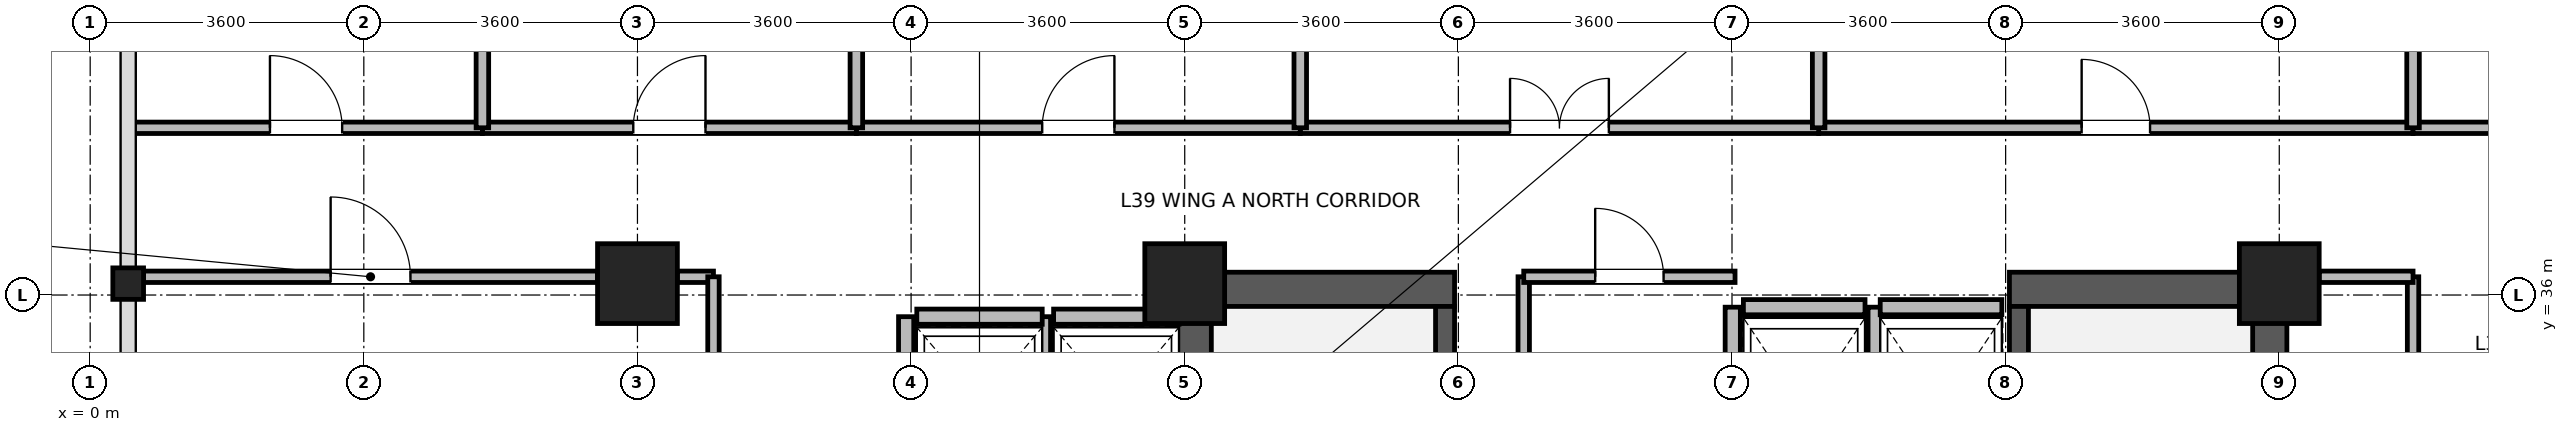
"""IFC4 building model, lengths in metres.
Left out: names, types, materials, properties, quantities, classifications, styles, units other than length and angle.
Written with IfcOpenShell. Run it as: python <this file> out.ifc"""

import sys

from ifc_helpers import new_model, si_unit, direction, frame, frame_2d, origin, origin_2d, place, context, subcontext, project, spatial, rectangle, i_section, extrude, source, transform, mapped, element, fill, save


model = new_model("IFC4")
c1 = context("Model", 3, precision=1e-05, world=origin(), true_north=direction((0.0, 1.0)))
c2 = subcontext(c1, "Body", "Model", "MODEL_VIEW")
j1 = project(units=[si_unit("LENGTHUNIT", "METRE"), si_unit("PLANEANGLEUNIT", "RADIAN")], contexts=[c1])
p1 = place(None, origin())
s1 = spatial("IfcSite", under=j1, at=p1, CompositionType="ELEMENT")
p2 = place(p1, origin())
s2 = spatial("IfcBuilding", under=s1, at=p2, CompositionType="ELEMENT")
p3 = place(p2, frame((0.0, 0.0, 155.0)))
s3 = spatial("IfcBuildingStorey", under=s2, at=p3, CompositionType="ELEMENT", Elevation=155.0)
for number, where, z_axis, x_axis in (
    (1, (14.525, 28.4, 0.0), (0.0, 0.0, 1.0), (0.0, 1.0, 0.0)),
    (2, (28.675, 28.4, 0.0), (0.0, 0.0, 1.0), (0.0, 1.0, 0.0)),
):
    element("IfcWall", number, at=place(p3, frame(where, z_axis=z_axis, x_axis=x_axis)), inside=s3, PredefinedType="SHEAR", context=c2, shape_type="SweptSolid", body=[
        extrude(rectangle(XDim=7.9, YDim=0.45, at=frame_2d((3.95, 0.0))), origin(), (0.0, 0.0, 1.0), 3.46),
    ])
for number, where, z_axis, x_axis in (
    (3, (14.75, 36.075, 0.0), (0.0, 0.0, 1.0), (1.0, 0.0, 0.0)),
    (4, (25.25, 36.075, 0.0), (0.0, 0.0, 1.0), (1.0, 0.0, 0.0)),
):
    element("IfcWall", number, at=place(p3, frame(where, z_axis=z_axis, x_axis=x_axis)), inside=s3, PredefinedType="SHEAR", context=c2, shape_type="SweptSolid", body=[
        extrude(rectangle(XDim=3.2, YDim=0.45, at=frame_2d((1.6, 0.0))), origin(), (0.0, 0.0, 1.0), 3.46),
    ])
p4 = place(p3, frame((17.825, 28.85, 0.0), z_axis=(0.0, 0.0, 1.0), x_axis=(0.0, 1.0, 0.0)))
e5 = element("IfcWall", 5, at=p4, inside=s3, PredefinedType="SHEAR", context=c2, shape_type="SweptSolid", body=[
    extrude(rectangle(XDim=7.0, YDim=0.25, at=frame_2d((3.5, 0.0))), origin(), (0.0, 0.0, 1.0), 3.46),
])
p5 = place(p4, frame((0.15, 0.0, 0.0)))
e6 = element("IfcOpeningElement", 6, at=p5, cuts=e5, PredefinedType="OPENING", context=c2, shape_type="SweptSolid", body=[
    extrude(rectangle(XDim=1.1, YDim=2.08, at=frame_2d((0.55, 1.04))), frame((0.0, 0.135, 0.0), z_axis=(0.0, -1.0, 0.0), x_axis=(1.0, 0.0, 0.0)), (0.0, 0.0, 1.0), 0.27),
])
p6 = place(p3, frame((25.375, 28.85, 0.0), z_axis=(0.0, 0.0, 1.0), x_axis=(0.0, 1.0, 0.0)))
e7 = element("IfcWall", 7, at=p6, inside=s3, PredefinedType="SHEAR", context=c2, shape_type="SweptSolid", body=[
    extrude(rectangle(XDim=7.0, YDim=0.25, at=frame_2d((3.5, 0.0))), origin(), (0.0, 0.0, 1.0), 3.46),
])
p7 = place(p6, frame((0.15, 0.0, 0.0)))
e8 = element("IfcOpeningElement", 8, at=p7, cuts=e7, PredefinedType="OPENING", context=c2, shape_type="SweptSolid", body=[
    extrude(rectangle(XDim=1.1, YDim=2.08, at=frame_2d((0.55, 1.04))), frame((0.0, 0.135, 0.0), z_axis=(0.0, -1.0, 0.0), x_axis=(1.0, 0.0, 0.0)), (0.0, 0.0, 1.0), 0.27),
])
m1 = source(origin(), c2, "Body", "SweptSolid", [
    extrude(rectangle(XDim=1.05, YDim=1.05, at=origin_2d()), origin(), (0.0, 0.0, 1.0), 3.7),
])
for number, where, z_axis, x_axis in (
    (9, (7.2, 36.15, 0.0), (0.0, 0.0, 1.0), (1.0, 0.0, 0.0)),
    (10, (14.4, 36.15, 0.0), (0.0, 0.0, 1.0), (1.0, 0.0, 0.0)),
    (11, (28.8, 36.15, 0.0), (0.0, 0.0, 1.0), (1.0, 0.0, 0.0)),
):
    element("IfcColumn", number, at=place(p3, frame(where, z_axis=z_axis, x_axis=x_axis)), inside=s3, PredefinedType="COLUMN", context=c2, shape_type="MappedRepresentation", body=[
        mapped(m1, transform((0.0, 0.0, 0.0), x_axis=(1.0, 0.0, 0.0), y_axis=(0.0, 1.0, 0.0), z_axis=(0.0, 0.0, 1.0), scale=1.0)),
    ])
m2 = source(origin(), c2, "Body", "SweptSolid", [
    extrude(i_section(OverallWidth=0.404, OverallDepth=0.414, WebThickness=0.021, FlangeThickness=0.028, FilletRadius=0.015, at=origin_2d()), origin(), (0.0, 0.0, 1.0), 3.7),
])
p8 = place(p3, frame((0.5, 36.15, 0.0), z_axis=(0.0, 0.0, 1.0), x_axis=(1.0, 0.0, 0.0)))
e12 = element("IfcColumn", 12, at=p8, inside=s3, PredefinedType="COLUMN", context=c2, shape_type="MappedRepresentation", body=[
    mapped(m2, transform((0.0, 0.0, 0.0), x_axis=(1.0, 0.0, 0.0), y_axis=(0.0, 1.0, 0.0), z_axis=(0.0, 0.0, 1.0), scale=1.0)),
])
p9 = place(p3, frame((12.675, 35.715, 0.0), z_axis=(0.0, 0.0, 1.0), x_axis=(1.0, 0.0, 0.0)))
e13 = element("IfcWall", 13, at=p9, inside=s3, PredefinedType="PARTITIONING", context=c2, shape_type="SweptSolid", body=[
    extrude(rectangle(XDim=1.65, YDim=0.2, at=frame_2d((0.825, 0.0))), origin(), (0.0, 0.0, 1.0), 3.44),
])
p10 = place(p3, frame((12.535, 33.485, 0.0), z_axis=(0.0, 0.0, 1.0), x_axis=(0.0, 1.0, 0.0)))
e14 = element("IfcWall", 14, at=p10, inside=s3, PredefinedType="PARTITIONING", context=c2, shape_type="SweptSolid", body=[
    extrude(rectangle(XDim=2.23, YDim=0.2, at=frame_2d((1.115, 0.0))), origin(), (0.0, 0.0, 1.0), 3.44),
])
p11 = place(p3, frame((10.875, 35.715, 0.0), z_axis=(0.0, 0.0, 1.0), x_axis=(1.0, 0.0, 0.0)))
e15 = element("IfcWall", 15, at=p11, inside=s3, PredefinedType="PARTITIONING", context=c2, shape_type="SweptSolid", body=[
    extrude(rectangle(XDim=1.65, YDim=0.2, at=frame_2d((0.825, 0.0))), origin(), (0.0, 0.0, 1.0), 3.44),
])
p12 = place(p3, frame((10.735, 33.485, 0.0), z_axis=(0.0, 0.0, 1.0), x_axis=(0.0, 1.0, 0.0)))
e16 = element("IfcWall", 16, at=p12, inside=s3, PredefinedType="PARTITIONING", context=c2, shape_type="SweptSolid", body=[
    extrude(rectangle(XDim=2.23, YDim=0.2, at=frame_2d((1.115, 0.0))), origin(), (0.0, 0.0, 1.0), 3.44),
])
p13 = place(p3, frame((21.75, 35.84, 0.0), z_axis=(0.0, 0.0, 1.0), x_axis=(1.0, 0.0, 0.0)))
e17 = element("IfcWall", 17, at=p13, inside=s3, PredefinedType="PARTITIONING", context=c2, shape_type="SweptSolid", body=[
    extrude(rectangle(XDim=1.6, YDim=0.2, at=frame_2d((0.8, 0.0))), origin(), (0.0, 0.0, 1.0), 2.44),
])
for number, where, z_axis, x_axis in (
    (18, (21.61, 33.16, 0.0), (0.0, 0.0, 1.0), (0.0, 1.0, 0.0)),
    (19, (23.49, 33.16, 0.0), (0.0, 0.0, 1.0), (0.0, 1.0, 0.0)),
):
    element("IfcWall", number, at=place(p3, frame(where, z_axis=z_axis, x_axis=x_axis)), inside=s3, PredefinedType="PARTITIONING", context=c2, shape_type="SweptSolid", body=[
        extrude(rectangle(XDim=2.68, YDim=0.2, at=frame_2d((1.34, 0.0))), origin(), (0.0, 0.0, 1.0), 3.44),
    ])
p14 = place(p3, frame((23.55, 35.84, 0.0), z_axis=(0.0, 0.0, 1.0), x_axis=(1.0, 0.0, 0.0)))
e20 = element("IfcWall", 20, at=p14, inside=s3, PredefinedType="PARTITIONING", context=c2, shape_type="SweptSolid", body=[
    extrude(rectangle(XDim=1.6, YDim=0.2, at=frame_2d((0.8, 0.0))), origin(), (0.0, 0.0, 1.0), 2.44),
])
p15 = place(p3, frame((22.74, 38.2, 0.0), z_axis=(0.0, 0.0, 1.0), x_axis=(1.0, 0.0, 0.0)))
e21 = element("IfcWall", 21, at=p15, inside=s3, PredefinedType="PARTITIONING", context=c2, shape_type="SweptSolid", body=[
    extrude(rectangle(XDim=7.82, YDim=0.15, at=frame_2d((3.91, 0.0))), origin(), (0.0, 0.0, 1.0), 3.44),
])
p16 = place(p15, frame((3.46, 0.0, 0.0)))
e22 = element("IfcOpeningElement", 22, at=p16, cuts=e21, PredefinedType="OPENING", context=c2, shape_type="SweptSolid", body=[
    extrude(rectangle(XDim=0.9, YDim=2.08, at=frame_2d((0.45, 1.04))), frame((0.0, 0.085, 0.0), z_axis=(0.0, -1.0, 0.0), x_axis=(1.0, 0.0, 0.0)), (0.0, 0.0, 1.0), 0.17),
])
p17 = place(p3, frame((0.702, 36.24, 0.0), z_axis=(0.0, 0.0, 1.0), x_axis=(1.0, 0.0, 0.0)))
e23 = element("IfcWall", 23, at=p17, inside=s3, PredefinedType="PARTITIONING", context=c2, shape_type="SweptSolid", body=[
    extrude(rectangle(XDim=5.973, YDim=0.15, at=frame_2d((2.987, 0.0))), origin(), (0.0, 0.0, 1.0), 2.84),
])
p18 = place(p17, frame((2.461, 0.0, 0.0)))
e24 = element("IfcOpeningElement", 24, at=p18, cuts=e23, PredefinedType="OPENING", context=c2, shape_type="SweptSolid", body=[
    extrude(rectangle(XDim=1.05, YDim=2.12, at=frame_2d((0.525, 1.06))), frame((0.0, 0.085, 0.0), z_axis=(0.0, -1.0, 0.0), x_axis=(1.0, 0.0, 0.0)), (0.0, 0.0, 1.0), 0.17),
])
p19 = place(p3, frame((7.725, 36.24, 0.0), z_axis=(0.0, 0.0, 1.0), x_axis=(1.0, 0.0, 0.0)))
e25 = element("IfcWall", 25, at=p19, inside=s3, PredefinedType="PARTITIONING", context=c2, shape_type="SweptSolid", body=[
    extrude(rectangle(XDim=0.475, YDim=0.15, at=frame_2d((0.237, 0.0))), origin(), (0.0, 0.0, 1.0), 2.84),
])
p20 = place(p3, frame((15.92, 38.2, 0.0), z_axis=(0.0, 0.0, 1.0), x_axis=(1.0, 0.0, 0.0)))
e26 = element("IfcWall", 26, at=p20, inside=s3, PredefinedType="PARTITIONING", context=c2, shape_type="SweptSolid", body=[
    extrude(rectangle(XDim=6.82, YDim=0.15, at=frame_2d((3.41, 0.0))), origin(), (0.0, 0.0, 1.0), 3.44),
])
p21 = place(p20, frame((2.76, 0.0, 0.0)))
e27 = element("IfcOpeningElement", 27, at=p21, cuts=e26, PredefinedType="OPENING", context=c2, shape_type="SweptSolid", body=[
    extrude(rectangle(XDim=1.3, YDim=2.12, at=frame_2d((0.65, 1.06))), frame((0.0, 0.085, 0.0), z_axis=(0.0, -1.0, 0.0), x_axis=(1.0, 0.0, 0.0)), (0.0, 0.0, 1.0), 0.17),
])
p22 = place(p3, frame((10.08, 38.2, 0.0), z_axis=(0.0, 0.0, 1.0), x_axis=(1.0, 0.0, 0.0)))
e28 = element("IfcWall", 28, at=p22, inside=s3, PredefinedType="PARTITIONING", context=c2, shape_type="SweptSolid", body=[
    extrude(rectangle(XDim=5.84, YDim=0.15, at=frame_2d((2.92, 0.0))), origin(), (0.0, 0.0, 1.0), 3.44),
])
p23 = place(p22, frame((2.445, 0.0, 0.0)))
e29 = element("IfcOpeningElement", 29, at=p23, cuts=e28, PredefinedType="OPENING", context=c2, shape_type="SweptSolid", body=[
    extrude(rectangle(XDim=0.95, YDim=2.1, at=frame_2d((0.475, 1.05))), frame((0.0, 0.085, 0.0), z_axis=(0.0, -1.0, 0.0), x_axis=(1.0, 0.0, 0.0)), (0.0, 0.0, 1.0), 0.17),
])
p24 = place(p3, frame((5.16, 38.2, 0.0), z_axis=(0.0, 0.0, 1.0), x_axis=(1.0, 0.0, 0.0)))
e30 = element("IfcWall", 30, at=p24, inside=s3, PredefinedType="PARTITIONING", context=c2, shape_type="SweptSolid", body=[
    extrude(rectangle(XDim=4.92, YDim=0.15, at=frame_2d((2.46, 0.0))), origin(), (0.0, 0.0, 1.0), 3.44),
])
p25 = place(p24, frame((1.985, 0.0, 0.0)))
e31 = element("IfcOpeningElement", 31, at=p25, cuts=e30, PredefinedType="OPENING", context=c2, shape_type="SweptSolid", body=[
    extrude(rectangle(XDim=0.95, YDim=2.1, at=frame_2d((0.475, 1.05))), frame((0.0, 0.085, 0.0), z_axis=(0.0, -1.0, 0.0), x_axis=(1.0, 0.0, 0.0)), (0.0, 0.0, 1.0), 0.17),
])
p26 = place(p3, frame((30.56, 38.2, 0.0), z_axis=(0.0, 0.0, 1.0), x_axis=(1.0, 0.0, 0.0)))
e32 = element("IfcWall", 32, at=p26, inside=s3, PredefinedType="PARTITIONING", context=c2, shape_type="SweptSolid", body=[
    extrude(rectangle(XDim=4.8, YDim=0.15, at=frame_2d((2.4, 0.0))), origin(), (0.0, 0.0, 1.0), 3.44),
])
p27 = place(p26, frame((1.75, 0.0, 0.0)))
e33 = element("IfcOpeningElement", 33, at=p27, cuts=e32, PredefinedType="OPENING", context=c2, shape_type="SweptSolid", body=[
    extrude(rectangle(XDim=1.3, YDim=2.12, at=frame_2d((0.65, 1.06))), frame((0.0, 0.085, 0.0), z_axis=(0.0, -1.0, 0.0), x_axis=(1.0, 0.0, 0.0)), (0.0, 0.0, 1.0), 0.17),
])
p28 = place(p3, frame((0.52, 38.2, 0.0), z_axis=(0.0, 0.0, 1.0), x_axis=(1.0, 0.0, 0.0)))
e34 = element("IfcWall", 34, at=p28, inside=s3, PredefinedType="PARTITIONING", context=c2, shape_type="SweptSolid", body=[
    extrude(rectangle(XDim=4.64, YDim=0.15, at=frame_2d((2.32, 0.0))), origin(), (0.0, 0.0, 1.0), 3.44),
])
p29 = place(p28, frame((1.845, 0.0, 0.0)))
e35 = element("IfcOpeningElement", 35, at=p29, cuts=e34, PredefinedType="OPENING", context=c2, shape_type="SweptSolid", body=[
    extrude(rectangle(XDim=0.95, YDim=2.1, at=frame_2d((0.475, 1.05))), frame((0.0, 0.085, 0.0), z_axis=(0.0, -1.0, 0.0), x_axis=(1.0, 0.0, 0.0)), (0.0, 0.0, 1.0), 0.17),
])
p30 = place(p3, frame((30.56, 31.64, 0.0), z_axis=(0.0, 0.0, 1.0), x_axis=(0.0, 1.0, 0.0)))
e36 = element("IfcWall", 36, at=p30, inside=s3, PredefinedType="PARTITIONING", context=c2, shape_type="SweptSolid", body=[
    extrude(rectangle(XDim=4.6, YDim=0.15, at=frame_2d((2.3, 0.0))), origin(), (0.0, 0.0, 1.0), 3.44),
])
p31 = place(p30, frame((1.65, 0.0, 0.0)))
e37 = element("IfcOpeningElement", 37, at=p31, cuts=e36, PredefinedType="OPENING", context=c2, shape_type="SweptSolid", body=[
    extrude(rectangle(XDim=1.3, YDim=2.12, at=frame_2d((0.65, 1.06))), frame((0.0, 0.085, 0.0), z_axis=(0.0, -1.0, 0.0), x_axis=(1.0, 0.0, 0.0)), (0.0, 0.0, 1.0), 0.17),
])
p32 = place(p3, frame((8.2, 32.4, 0.0), z_axis=(0.0, 0.0, 1.0), x_axis=(0.0, 1.0, 0.0)))
e38 = element("IfcWall", 38, at=p32, inside=s3, PredefinedType="PARTITIONING", context=c2, shape_type="SweptSolid", body=[
    extrude(rectangle(XDim=3.84, YDim=0.15, at=frame_2d((1.92, 0.0))), origin(), (0.0, 0.0, 1.0), 3.44),
])
p33 = place(p3, frame((18.86, 33.36, 0.0), z_axis=(0.0, 0.0, 1.0), x_axis=(0.0, 1.0, 0.0)))
e39 = element("IfcWall", 39, at=p33, inside=s3, PredefinedType="PARTITIONING", context=c2, shape_type="SweptSolid", body=[
    extrude(rectangle(XDim=2.88, YDim=0.15, at=frame_2d((1.44, 0.0))), origin(), (0.0, 0.0, 1.0), 3.44),
])
p34 = place(p3, frame((18.86, 36.24, 0.0), z_axis=(0.0, 0.0, 1.0), x_axis=(1.0, 0.0, 0.0)))
e40 = element("IfcWall", 40, at=p34, inside=s3, PredefinedType="PARTITIONING", context=c2, shape_type="SweptSolid", body=[
    extrude(rectangle(XDim=2.78, YDim=0.15, at=frame_2d((1.39, 0.0))), origin(), (0.0, 0.0, 1.0), 2.44),
])
p35 = place(p34, frame((0.94, 0.0, 0.0)))
e41 = element("IfcOpeningElement", 41, at=p35, cuts=e40, PredefinedType="OPENING", context=c2, shape_type="SweptSolid", body=[
    extrude(rectangle(XDim=0.9, YDim=2.08, at=frame_2d((0.45, 1.04))), frame((0.0, 0.085, 0.0), z_axis=(0.0, -1.0, 0.0), x_axis=(1.0, 0.0, 0.0)), (0.0, 0.0, 1.0), 0.17),
])
p36 = place(p3, frame((29.325, 36.24, 0.0), z_axis=(0.0, 0.0, 1.0), x_axis=(1.0, 0.0, 0.0)))
e42 = element("IfcWall", 42, at=p36, inside=s3, PredefinedType="PARTITIONING", context=c2, shape_type="SweptSolid", body=[
    extrude(rectangle(XDim=1.235, YDim=0.15, at=frame_2d((0.618, 0.0))), origin(), (0.0, 0.0, 1.0), 2.84),
])
for number, where, z_axis, x_axis in (
    (43, (15.92, 38.2, 0.0), (0.0, 0.0, 1.0), (0.0, 1.0, 0.0)),
    (44, (22.74, 38.2, 0.0), (0.0, 0.0, 1.0), (0.0, 1.0, 0.0)),
    (45, (30.56, 38.2, 0.0), (0.0, 0.0, 1.0), (0.0, 1.0, 0.0)),
):
    element("IfcWall", number, at=place(p3, frame(where, z_axis=z_axis, x_axis=x_axis)), inside=s3, PredefinedType="PARTITIONING", context=c2, shape_type="SweptSolid", body=[
        extrude(rectangle(XDim=4.868, YDim=0.165, at=frame_2d((2.434, 0.0))), origin(), (0.0, 0.0, 1.0), 3.44),
    ])
for number, where, z_axis, x_axis in (
    (46, (5.16, 38.2, 0.0), (0.0, 0.0, 1.0), (0.0, 1.0, 0.0)),
    (47, (10.08, 38.2, 0.0), (0.0, 0.0, 1.0), (0.0, 1.0, 0.0)),
):
    element("IfcWall", number, at=place(p3, frame(where, z_axis=z_axis, x_axis=x_axis)), inside=s3, PredefinedType="PARTITIONING", context=c2, shape_type="SweptSolid", body=[
        extrude(rectangle(XDim=3.1, YDim=0.165, at=frame_2d((1.55, 0.0))), origin(), (0.0, 0.0, 1.0), 3.44),
    ])
p37 = place(p16, origin())
e48 = element("IfcDoor", 48, at=p37, inside=s3, OperationType="SINGLE_SWING_LEFT", PredefinedType="DOOR", context=c2, shape_type="SweptSolid", body=[
    extrude(rectangle(XDim=0.9, YDim=2.08, at=frame_2d((0.45, 1.04))), frame((0.0, 0.025, 0.0), z_axis=(0.0, -1.0, 0.0), x_axis=(1.0, 0.0, 0.0)), (0.0, 0.0, 1.0), 0.05),
])
fill(e22, e48)
p38 = place(p18, origin())
e49 = element("IfcDoor", 49, at=p38, inside=s3, OperationType="SINGLE_SWING_LEFT", PredefinedType="DOOR", context=c2, shape_type="SweptSolid", body=[
    extrude(rectangle(XDim=1.05, YDim=2.12, at=frame_2d((0.525, 1.06))), frame((0.0, 0.025, 0.0), z_axis=(0.0, -1.0, 0.0), x_axis=(1.0, 0.0, 0.0)), (0.0, 0.0, 1.0), 0.05),
])
fill(e24, e49)
p39 = place(p21, origin())
e50 = element("IfcDoor", 50, at=p39, inside=s3, OperationType="DOUBLE_DOOR_SINGLE_SWING", PredefinedType="DOOR", context=c2, shape_type="SweptSolid", body=[
    extrude(rectangle(XDim=1.3, YDim=2.12, at=frame_2d((0.65, 1.06))), frame((0.0, 0.025, 0.0), z_axis=(0.0, -1.0, 0.0), x_axis=(1.0, 0.0, 0.0)), (0.0, 0.0, 1.0), 0.05),
])
fill(e27, e50)
p40 = place(p23, origin())
e51 = element("IfcDoor", 51, at=p40, inside=s3, OperationType="SINGLE_SWING_RIGHT", PredefinedType="DOOR", context=c2, shape_type="SweptSolid", body=[
    extrude(rectangle(XDim=0.95, YDim=2.1, at=frame_2d((0.475, 1.05))), frame((0.0, 0.025, 0.0), z_axis=(0.0, -1.0, 0.0), x_axis=(1.0, 0.0, 0.0)), (0.0, 0.0, 1.0), 0.05),
])
fill(e29, e51)
p41 = place(p25, origin())
e52 = element("IfcDoor", 52, at=p41, inside=s3, OperationType="SINGLE_SWING_RIGHT", PredefinedType="DOOR", context=c2, shape_type="SweptSolid", body=[
    extrude(rectangle(XDim=0.95, YDim=2.1, at=frame_2d((0.475, 1.05))), frame((0.0, 0.025, 0.0), z_axis=(0.0, -1.0, 0.0), x_axis=(1.0, 0.0, 0.0)), (0.0, 0.0, 1.0), 0.05),
])
fill(e31, e52)
p42 = place(p29, origin())
e53 = element("IfcDoor", 53, at=p42, inside=s3, OperationType="SINGLE_SWING_LEFT", PredefinedType="DOOR", context=c2, shape_type="SweptSolid", body=[
    extrude(rectangle(XDim=0.95, YDim=2.1, at=frame_2d((0.475, 1.05))), frame((0.0, 0.025, 0.0), z_axis=(0.0, -1.0, 0.0), x_axis=(1.0, 0.0, 0.0)), (0.0, 0.0, 1.0), 0.05),
])
fill(e35, e53)
p43 = place(p35, origin())
e54 = element("IfcDoor", 54, at=p43, inside=s3, OperationType="SINGLE_SWING_LEFT", PredefinedType="DOOR", context=c2, shape_type="SweptSolid", body=[
    extrude(rectangle(XDim=0.9, YDim=2.08, at=frame_2d((0.45, 1.04))), frame((0.0, 0.025, 0.0), z_axis=(0.0, -1.0, 0.0), x_axis=(1.0, 0.0, 0.0)), (0.0, 0.0, 1.0), 0.05),
])
fill(e41, e54)
save(model, sys.argv[1])
